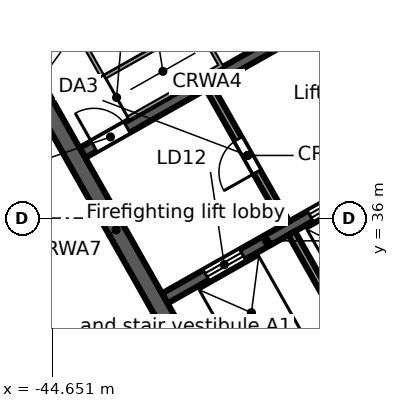
"""IFC4 building model, lengths in metres.
Left out: names, types, materials, properties, quantities, classifications, styles, units other than length and angle.
Written with IfcOpenShell. Run it as: python <this file> out.ifc"""

import sys

from ifc_helpers import new_model, si_unit, direction, frame, frame_2d, origin, place, context, subcontext, project, spatial, rectangle, extrude, element, fill, save


model = new_model("IFC4")
c1 = context("Model", 3, precision=1e-05, world=origin(), true_north=direction((0.0, 1.0)))
c2 = subcontext(c1, "Body", "Model", "MODEL_VIEW")
j1 = project(units=[si_unit("LENGTHUNIT", "METRE"), si_unit("PLANEANGLEUNIT", "RADIAN")], contexts=[c1])
p1 = place(None, origin())
s1 = spatial("IfcSite", under=j1, at=p1, CompositionType="ELEMENT")
p2 = place(p1, origin())
s2 = spatial("IfcBuilding", under=s1, at=p2, CompositionType="ELEMENT")
p3 = place(p2, frame((0.0, 0.0, 211.4)))
s3 = spatial("IfcBuildingStorey", under=s2, at=p3, CompositionType="ELEMENT", Elevation=211.4)
p4 = place(p3, frame((-0.046, 47.974, 0.0), z_axis=(0.0, 0.0, 1.0), x_axis=(-0.870356579543, -0.492421998337, 0.0)))
e1 = element("IfcWall", 1, at=p4, inside=s3, PredefinedType="STANDARD", context=c2, shape_type="SweptSolid", body=[
    extrude(rectangle(XDim=43.754, YDim=0.25, at=frame_2d((21.877, 0.0))), origin(), (0.0, 0.0, 1.0), 3.62),
])
p5 = place(p4, frame((41.061, 0.0, 0.8)))
e2 = element("IfcOpeningElement", 2, at=p5, cuts=e1, PredefinedType="OPENING", context=c2, shape_type="SweptSolid", body=[
    extrude(rectangle(XDim=2.4, YDim=2.2, at=frame_2d((1.2, 1.1))), frame((0.0, 0.135, 0.0), z_axis=(0.0, -1.0, 0.0), x_axis=(1.0, 0.0, 0.0)), (0.0, 0.0, 1.0), 0.27),
])
p6 = place(p4, frame((38.443, 0.0, 0.0)))
e3 = element("IfcOpeningElement", 3, at=p6, cuts=e1, PredefinedType="OPENING", context=c2, shape_type="SweptSolid", body=[
    extrude(rectangle(XDim=1.8, YDim=2.4, at=frame_2d((0.9, 1.2))), frame((0.0, 0.135, 0.0), z_axis=(0.0, -1.0, 0.0), x_axis=(1.0, 0.0, 0.0)), (0.0, 0.0, 1.0), 0.27),
])
p7 = place(p4, frame((35.225, 0.0, 0.8)))
e4 = element("IfcOpeningElement", 4, at=p7, cuts=e1, PredefinedType="OPENING", context=c2, shape_type="SweptSolid", body=[
    extrude(rectangle(XDim=2.4, YDim=2.2, at=frame_2d((1.2, 1.1))), frame((0.0, 0.135, 0.0), z_axis=(0.0, -1.0, 0.0), x_axis=(1.0, 0.0, 0.0)), (0.0, 0.0, 1.0), 0.27),
])
p8 = place(p4, frame((32.307, 0.0, 0.8)))
e5 = element("IfcOpeningElement", 5, at=p8, cuts=e1, PredefinedType="OPENING", context=c2, shape_type="SweptSolid", body=[
    extrude(rectangle(XDim=2.4, YDim=2.2, at=frame_2d((1.2, 1.1))), frame((0.0, 0.135, 0.0), z_axis=(0.0, -1.0, 0.0), x_axis=(1.0, 0.0, 0.0)), (0.0, 0.0, 1.0), 0.27),
])
p9 = place(p4, frame((29.688, 0.0, 0.0)))
e6 = element("IfcOpeningElement", 6, at=p9, cuts=e1, PredefinedType="OPENING", context=c2, shape_type="SweptSolid", body=[
    extrude(rectangle(XDim=1.8, YDim=2.4, at=frame_2d((0.9, 1.2))), frame((0.0, 0.135, 0.0), z_axis=(0.0, -1.0, 0.0), x_axis=(1.0, 0.0, 0.0)), (0.0, 0.0, 1.0), 0.27),
])
p10 = place(p4, frame((26.47, 0.0, 0.8)))
e7 = element("IfcOpeningElement", 7, at=p10, cuts=e1, PredefinedType="OPENING", context=c2, shape_type="SweptSolid", body=[
    extrude(rectangle(XDim=2.4, YDim=2.2, at=frame_2d((1.2, 1.1))), frame((0.0, 0.135, 0.0), z_axis=(0.0, -1.0, 0.0), x_axis=(1.0, 0.0, 0.0)), (0.0, 0.0, 1.0), 0.27),
])
p11 = place(p4, frame((23.552, 0.0, 0.8)))
e8 = element("IfcOpeningElement", 8, at=p11, cuts=e1, PredefinedType="OPENING", context=c2, shape_type="SweptSolid", body=[
    extrude(rectangle(XDim=2.4, YDim=2.2, at=frame_2d((1.2, 1.1))), frame((0.0, 0.135, 0.0), z_axis=(0.0, -1.0, 0.0), x_axis=(1.0, 0.0, 0.0)), (0.0, 0.0, 1.0), 0.27),
])
p12 = place(p4, frame((20.934, 0.0, 0.0)))
e9 = element("IfcOpeningElement", 9, at=p12, cuts=e1, PredefinedType="OPENING", context=c2, shape_type="SweptSolid", body=[
    extrude(rectangle(XDim=1.8, YDim=2.4, at=frame_2d((0.9, 1.2))), frame((0.0, 0.135, 0.0), z_axis=(0.0, -1.0, 0.0), x_axis=(1.0, 0.0, 0.0)), (0.0, 0.0, 1.0), 0.27),
])
p13 = place(p4, frame((17.716, 0.0, 0.8)))
e10 = element("IfcOpeningElement", 10, at=p13, cuts=e1, PredefinedType="OPENING", context=c2, shape_type="SweptSolid", body=[
    extrude(rectangle(XDim=2.4, YDim=2.2, at=frame_2d((1.2, 1.1))), frame((0.0, 0.135, 0.0), z_axis=(0.0, -1.0, 0.0), x_axis=(1.0, 0.0, 0.0)), (0.0, 0.0, 1.0), 0.27),
])
p14 = place(p4, frame((14.798, 0.0, 0.8)))
e11 = element("IfcOpeningElement", 11, at=p14, cuts=e1, PredefinedType="OPENING", context=c2, shape_type="SweptSolid", body=[
    extrude(rectangle(XDim=2.4, YDim=2.2, at=frame_2d((1.2, 1.1))), frame((0.0, 0.135, 0.0), z_axis=(0.0, -1.0, 0.0), x_axis=(1.0, 0.0, 0.0)), (0.0, 0.0, 1.0), 0.27),
])
p15 = place(p4, frame((12.179, 0.0, 0.0)))
e12 = element("IfcOpeningElement", 12, at=p15, cuts=e1, PredefinedType="OPENING", context=c2, shape_type="SweptSolid", body=[
    extrude(rectangle(XDim=1.8, YDim=2.4, at=frame_2d((0.9, 1.2))), frame((0.0, 0.135, 0.0), z_axis=(0.0, -1.0, 0.0), x_axis=(1.0, 0.0, 0.0)), (0.0, 0.0, 1.0), 0.27),
])
p16 = place(p4, frame((8.961, 0.0, 0.8)))
e13 = element("IfcOpeningElement", 13, at=p16, cuts=e1, PredefinedType="OPENING", context=c2, shape_type="SweptSolid", body=[
    extrude(rectangle(XDim=2.4, YDim=2.2, at=frame_2d((1.2, 1.1))), frame((0.0, 0.135, 0.0), z_axis=(0.0, -1.0, 0.0), x_axis=(1.0, 0.0, 0.0)), (0.0, 0.0, 1.0), 0.27),
])
p17 = place(p4, frame((6.043, 0.0, 0.8)))
e14 = element("IfcOpeningElement", 14, at=p17, cuts=e1, PredefinedType="OPENING", context=c2, shape_type="SweptSolid", body=[
    extrude(rectangle(XDim=2.4, YDim=2.2, at=frame_2d((1.2, 1.1))), frame((0.0, 0.135, 0.0), z_axis=(0.0, -1.0, 0.0), x_axis=(1.0, 0.0, 0.0)), (0.0, 0.0, 1.0), 0.27),
])
p18 = place(p4, frame((3.425, 0.0, 0.0)))
e15 = element("IfcOpeningElement", 15, at=p18, cuts=e1, PredefinedType="OPENING", context=c2, shape_type="SweptSolid", body=[
    extrude(rectangle(XDim=1.8, YDim=2.4, at=frame_2d((0.9, 1.2))), frame((0.0, 0.135, 0.0), z_axis=(0.0, -1.0, 0.0), x_axis=(1.0, 0.0, 0.0)), (0.0, 0.0, 1.0), 0.27),
])
p19 = place(p4, frame((0.207, 0.0, 0.8)))
e16 = element("IfcOpeningElement", 16, at=p19, cuts=e1, PredefinedType="OPENING", context=c2, shape_type="SweptSolid", body=[
    extrude(rectangle(XDim=2.4, YDim=2.2, at=frame_2d((1.2, 1.1))), frame((0.0, 0.135, 0.0), z_axis=(0.0, -1.0, 0.0), x_axis=(1.0, 0.0, 0.0)), (0.0, 0.0, 1.0), 0.27),
])
p20 = place(p3, frame((-58.732, 38.771, 0.0), z_axis=(0.0, 0.0, 1.0), x_axis=(0.870354824205, 0.492425100887, 0.0)))
e17 = element("IfcWall", 17, at=p20, inside=s3, PredefinedType="STANDARD", context=c2, shape_type="SweptSolid", body=[
    extrude(rectangle(XDim=64.006, YDim=0.25, at=frame_2d((32.003, 0.0))), origin(), (0.0, 0.0, 1.0), 3.62),
])
p21 = place(p20, frame((61.259, 0.0, 0.8)))
e18 = element("IfcOpeningElement", 18, at=p21, cuts=e17, PredefinedType="OPENING", context=c2, shape_type="SweptSolid", body=[
    extrude(rectangle(XDim=2.4, YDim=2.2, at=frame_2d((1.2, 1.1))), frame((0.0, 0.135, 0.0), z_axis=(0.0, -1.0, 0.0), x_axis=(1.0, 0.0, 0.0)), (0.0, 0.0, 1.0), 0.27),
])
p22 = place(p20, frame((58.216, 0.0, 0.8)))
e19 = element("IfcOpeningElement", 19, at=p22, cuts=e17, PredefinedType="OPENING", context=c2, shape_type="SweptSolid", body=[
    extrude(rectangle(XDim=2.4, YDim=2.2, at=frame_2d((1.2, 1.1))), frame((0.0, 0.135, 0.0), z_axis=(0.0, -1.0, 0.0), x_axis=(1.0, 0.0, 0.0)), (0.0, 0.0, 1.0), 0.27),
])
p23 = place(p20, frame((55.173, 0.0, 0.8)))
e20 = element("IfcOpeningElement", 20, at=p23, cuts=e17, PredefinedType="OPENING", context=c2, shape_type="SweptSolid", body=[
    extrude(rectangle(XDim=2.4, YDim=2.2, at=frame_2d((1.2, 1.1))), frame((0.0, 0.135, 0.0), z_axis=(0.0, -1.0, 0.0), x_axis=(1.0, 0.0, 0.0)), (0.0, 0.0, 1.0), 0.27),
])
p24 = place(p20, frame((52.129, 0.0, 0.8)))
e21 = element("IfcOpeningElement", 21, at=p24, cuts=e17, PredefinedType="OPENING", context=c2, shape_type="SweptSolid", body=[
    extrude(rectangle(XDim=2.4, YDim=2.2, at=frame_2d((1.2, 1.1))), frame((0.0, 0.135, 0.0), z_axis=(0.0, -1.0, 0.0), x_axis=(1.0, 0.0, 0.0)), (0.0, 0.0, 1.0), 0.27),
])
p25 = place(p20, frame((49.086, 0.0, 0.8)))
e22 = element("IfcOpeningElement", 22, at=p25, cuts=e17, PredefinedType="OPENING", context=c2, shape_type="SweptSolid", body=[
    extrude(rectangle(XDim=2.4, YDim=2.2, at=frame_2d((1.2, 1.1))), frame((0.0, 0.135, 0.0), z_axis=(0.0, -1.0, 0.0), x_axis=(1.0, 0.0, 0.0)), (0.0, 0.0, 1.0), 0.27),
])
p26 = place(p20, frame((46.043, 0.0, 0.8)))
e23 = element("IfcOpeningElement", 23, at=p26, cuts=e17, PredefinedType="OPENING", context=c2, shape_type="SweptSolid", body=[
    extrude(rectangle(XDim=2.4, YDim=2.2, at=frame_2d((1.2, 1.1))), frame((0.0, 0.135, 0.0), z_axis=(0.0, -1.0, 0.0), x_axis=(1.0, 0.0, 0.0)), (0.0, 0.0, 1.0), 0.27),
])
p27 = place(p20, frame((43.0, 0.0, 0.8)))
e24 = element("IfcOpeningElement", 24, at=p27, cuts=e17, PredefinedType="OPENING", context=c2, shape_type="SweptSolid", body=[
    extrude(rectangle(XDim=2.4, YDim=2.2, at=frame_2d((1.2, 1.1))), frame((0.0, 0.135, 0.0), z_axis=(0.0, -1.0, 0.0), x_axis=(1.0, 0.0, 0.0)), (0.0, 0.0, 1.0), 0.27),
])
p28 = place(p20, frame((39.956, 0.0, 0.8)))
e25 = element("IfcOpeningElement", 25, at=p28, cuts=e17, PredefinedType="OPENING", context=c2, shape_type="SweptSolid", body=[
    extrude(rectangle(XDim=2.4, YDim=2.2, at=frame_2d((1.2, 1.1))), frame((0.0, 0.135, 0.0), z_axis=(0.0, -1.0, 0.0), x_axis=(1.0, 0.0, 0.0)), (0.0, 0.0, 1.0), 0.27),
])
p29 = place(p20, frame((36.913, 0.0, 0.8)))
e26 = element("IfcOpeningElement", 26, at=p29, cuts=e17, PredefinedType="OPENING", context=c2, shape_type="SweptSolid", body=[
    extrude(rectangle(XDim=2.4, YDim=2.2, at=frame_2d((1.2, 1.1))), frame((0.0, 0.135, 0.0), z_axis=(0.0, -1.0, 0.0), x_axis=(1.0, 0.0, 0.0)), (0.0, 0.0, 1.0), 0.27),
])
p30 = place(p20, frame((33.87, 0.0, 0.8)))
e27 = element("IfcOpeningElement", 27, at=p30, cuts=e17, PredefinedType="OPENING", context=c2, shape_type="SweptSolid", body=[
    extrude(rectangle(XDim=2.4, YDim=2.2, at=frame_2d((1.2, 1.1))), frame((0.0, 0.135, 0.0), z_axis=(0.0, -1.0, 0.0), x_axis=(1.0, 0.0, 0.0)), (0.0, 0.0, 1.0), 0.27),
])
p31 = place(p20, frame((30.826, 0.0, 0.8)))
e28 = element("IfcOpeningElement", 28, at=p31, cuts=e17, PredefinedType="OPENING", context=c2, shape_type="SweptSolid", body=[
    extrude(rectangle(XDim=2.4, YDim=2.2, at=frame_2d((1.2, 1.1))), frame((0.0, 0.135, 0.0), z_axis=(0.0, -1.0, 0.0), x_axis=(1.0, 0.0, 0.0)), (0.0, 0.0, 1.0), 0.27),
])
p32 = place(p20, frame((27.783, 0.0, 0.8)))
e29 = element("IfcOpeningElement", 29, at=p32, cuts=e17, PredefinedType="OPENING", context=c2, shape_type="SweptSolid", body=[
    extrude(rectangle(XDim=2.4, YDim=2.2, at=frame_2d((1.2, 1.1))), frame((0.0, 0.135, 0.0), z_axis=(0.0, -1.0, 0.0), x_axis=(1.0, 0.0, 0.0)), (0.0, 0.0, 1.0), 0.27),
])
p33 = place(p20, frame((24.74, 0.0, 0.8)))
e30 = element("IfcOpeningElement", 30, at=p33, cuts=e17, PredefinedType="OPENING", context=c2, shape_type="SweptSolid", body=[
    extrude(rectangle(XDim=2.4, YDim=2.2, at=frame_2d((1.2, 1.1))), frame((0.0, 0.135, 0.0), z_axis=(0.0, -1.0, 0.0), x_axis=(1.0, 0.0, 0.0)), (0.0, 0.0, 1.0), 0.27),
])
p34 = place(p20, frame((21.696, 0.0, 0.8)))
e31 = element("IfcOpeningElement", 31, at=p34, cuts=e17, PredefinedType="OPENING", context=c2, shape_type="SweptSolid", body=[
    extrude(rectangle(XDim=2.4, YDim=2.2, at=frame_2d((1.2, 1.1))), frame((0.0, 0.135, 0.0), z_axis=(0.0, -1.0, 0.0), x_axis=(1.0, 0.0, 0.0)), (0.0, 0.0, 1.0), 0.27),
])
p35 = place(p20, frame((18.653, 0.0, 0.8)))
e32 = element("IfcOpeningElement", 32, at=p35, cuts=e17, PredefinedType="OPENING", context=c2, shape_type="SweptSolid", body=[
    extrude(rectangle(XDim=2.4, YDim=2.2, at=frame_2d((1.2, 1.1))), frame((0.0, 0.135, 0.0), z_axis=(0.0, -1.0, 0.0), x_axis=(1.0, 0.0, 0.0)), (0.0, 0.0, 1.0), 0.27),
])
p36 = place(p20, frame((15.61, 0.0, 0.8)))
e33 = element("IfcOpeningElement", 33, at=p36, cuts=e17, PredefinedType="OPENING", context=c2, shape_type="SweptSolid", body=[
    extrude(rectangle(XDim=2.4, YDim=2.2, at=frame_2d((1.2, 1.1))), frame((0.0, 0.135, 0.0), z_axis=(0.0, -1.0, 0.0), x_axis=(1.0, 0.0, 0.0)), (0.0, 0.0, 1.0), 0.27),
])
p37 = place(p20, frame((12.567, 0.0, 0.8)))
e34 = element("IfcOpeningElement", 34, at=p37, cuts=e17, PredefinedType="OPENING", context=c2, shape_type="SweptSolid", body=[
    extrude(rectangle(XDim=2.4, YDim=2.2, at=frame_2d((1.2, 1.1))), frame((0.0, 0.135, 0.0), z_axis=(0.0, -1.0, 0.0), x_axis=(1.0, 0.0, 0.0)), (0.0, 0.0, 1.0), 0.27),
])
p38 = place(p20, frame((9.523, 0.0, 0.8)))
e35 = element("IfcOpeningElement", 35, at=p38, cuts=e17, PredefinedType="OPENING", context=c2, shape_type="SweptSolid", body=[
    extrude(rectangle(XDim=2.4, YDim=2.2, at=frame_2d((1.2, 1.1))), frame((0.0, 0.135, 0.0), z_axis=(0.0, -1.0, 0.0), x_axis=(1.0, 0.0, 0.0)), (0.0, 0.0, 1.0), 0.27),
])
p39 = place(p20, frame((6.48, 0.0, 0.8)))
e36 = element("IfcOpeningElement", 36, at=p39, cuts=e17, PredefinedType="OPENING", context=c2, shape_type="SweptSolid", body=[
    extrude(rectangle(XDim=2.4, YDim=2.2, at=frame_2d((1.2, 1.1))), frame((0.0, 0.135, 0.0), z_axis=(0.0, -1.0, 0.0), x_axis=(1.0, 0.0, 0.0)), (0.0, 0.0, 1.0), 0.27),
])
p40 = place(p20, frame((3.437, 0.0, 0.8)))
e37 = element("IfcOpeningElement", 37, at=p40, cuts=e17, PredefinedType="OPENING", context=c2, shape_type="SweptSolid", body=[
    extrude(rectangle(XDim=2.4, YDim=2.2, at=frame_2d((1.2, 1.1))), frame((0.0, 0.135, 0.0), z_axis=(0.0, -1.0, 0.0), x_axis=(1.0, 0.0, 0.0)), (0.0, 0.0, 1.0), 0.27),
])
p41 = place(p20, frame((0.393, 0.0, 0.8)))
e38 = element("IfcOpeningElement", 38, at=p41, cuts=e17, PredefinedType="OPENING", context=c2, shape_type="SweptSolid", body=[
    extrude(rectangle(XDim=2.4, YDim=2.2, at=frame_2d((1.2, 1.1))), frame((0.0, 0.135, 0.0), z_axis=(0.0, -1.0, 0.0), x_axis=(1.0, 0.0, 0.0)), (0.0, 0.0, 1.0), 0.27),
])
p42 = place(p3, frame((-44.115, 26.507, 0.0), z_axis=(0.0, 0.0, 1.0), x_axis=(-0.857166583633, 0.515039268311, 0.0)))
e39 = element("IfcWall", 39, at=p42, inside=s3, PredefinedType="STANDARD", context=c2, shape_type="SweptSolid", body=[
    extrude(rectangle(XDim=17.106, YDim=0.25, at=frame_2d((8.553, 0.0))), origin(), (0.0, 0.0, 1.0), 3.62),
])
p43 = place(p42, frame((14.417, 0.0, 0.8)))
e40 = element("IfcOpeningElement", 40, at=p43, cuts=e39, PredefinedType="OPENING", context=c2, shape_type="SweptSolid", body=[
    extrude(rectangle(XDim=2.4, YDim=2.2, at=frame_2d((1.2, 1.1))), frame((0.0, 0.135, 0.0), z_axis=(0.0, -1.0, 0.0), x_axis=(1.0, 0.0, 0.0)), (0.0, 0.0, 1.0), 0.27),
])
p44 = place(p42, frame((11.584, 0.0, 0.8)))
e41 = element("IfcOpeningElement", 41, at=p44, cuts=e39, PredefinedType="OPENING", context=c2, shape_type="SweptSolid", body=[
    extrude(rectangle(XDim=2.4, YDim=2.2, at=frame_2d((1.2, 1.1))), frame((0.0, 0.135, 0.0), z_axis=(0.0, -1.0, 0.0), x_axis=(1.0, 0.0, 0.0)), (0.0, 0.0, 1.0), 0.27),
])
p45 = place(p42, frame((8.75, 0.0, 0.8)))
e42 = element("IfcOpeningElement", 42, at=p45, cuts=e39, PredefinedType="OPENING", context=c2, shape_type="SweptSolid", body=[
    extrude(rectangle(XDim=2.4, YDim=2.2, at=frame_2d((1.2, 1.1))), frame((0.0, 0.135, 0.0), z_axis=(0.0, -1.0, 0.0), x_axis=(1.0, 0.0, 0.0)), (0.0, 0.0, 1.0), 0.27),
])
p46 = place(p42, frame((5.917, 0.0, 0.8)))
e43 = element("IfcOpeningElement", 43, at=p46, cuts=e39, PredefinedType="OPENING", context=c2, shape_type="SweptSolid", body=[
    extrude(rectangle(XDim=2.4, YDim=2.2, at=frame_2d((1.2, 1.1))), frame((0.0, 0.135, 0.0), z_axis=(0.0, -1.0, 0.0), x_axis=(1.0, 0.0, 0.0)), (0.0, 0.0, 1.0), 0.27),
])
p47 = place(p42, frame((3.084, 0.0, 0.8)))
e44 = element("IfcOpeningElement", 44, at=p47, cuts=e39, PredefinedType="OPENING", context=c2, shape_type="SweptSolid", body=[
    extrude(rectangle(XDim=2.4, YDim=2.2, at=frame_2d((1.2, 1.1))), frame((0.0, 0.135, 0.0), z_axis=(0.0, -1.0, 0.0), x_axis=(1.0, 0.0, 0.0)), (0.0, 0.0, 1.0), 0.27),
])
p48 = place(p42, frame((0.25, 0.0, 0.8)))
e45 = element("IfcOpeningElement", 45, at=p48, cuts=e39, PredefinedType="OPENING", context=c2, shape_type="SweptSolid", body=[
    extrude(rectangle(XDim=2.4, YDim=2.2, at=frame_2d((1.2, 1.1))), frame((0.0, 0.135, 0.0), z_axis=(0.0, -1.0, 0.0), x_axis=(1.0, 0.0, 0.0)), (0.0, 0.0, 1.0), 0.27),
])
p49 = place(p3, frame((-39.825, 29.684, 0.0), z_axis=(0.0, 0.0, 1.0), x_axis=(0.870353598469, 0.492427267353, 0.0)))
e46 = element("IfcWall", 46, at=p49, inside=s3, PredefinedType="SOLIDWALL", context=c2, shape_type="SweptSolid", body=[
    extrude(rectangle(XDim=17.0, YDim=0.45, at=frame_2d((8.5, 0.0))), origin(), (0.0, 0.0, 1.0), 3.62),
])
p50 = place(p49, frame((7.2, 0.0, 0.0)))
e47 = element("IfcOpeningElement", 47, at=p50, cuts=e46, PredefinedType="OPENING", context=c2, shape_type="SweptSolid", body=[
    extrude(rectangle(XDim=1.2, YDim=2.1, at=frame_2d((0.6, 1.05))), frame((0.0, 0.235, 0.0), z_axis=(0.0, -1.0, 0.0), x_axis=(1.0, 0.0, 0.0)), (0.0, 0.0, 1.0), 0.47),
])
p51 = place(p3, frame((-41.687, 33.887, 0.0), z_axis=(0.0, 0.0, 1.0), x_axis=(0.870355736587, 0.49242348826, 0.0)))
e48 = element("IfcWall", 48, at=p51, inside=s3, PredefinedType="SOLIDWALL", context=c2, shape_type="SweptSolid", body=[
    extrude(rectangle(XDim=6.15, YDim=0.3, at=frame_2d((3.075, 0.0))), origin(), (0.0, 0.0, 1.0), 3.62),
])
p52 = place(p51, frame((1.25, 0.0, 0.0)))
e49 = element("IfcOpeningElement", 49, at=p52, cuts=e48, PredefinedType="OPENING", context=c2, shape_type="SweptSolid", body=[
    extrude(rectangle(XDim=1.1, YDim=2.1, at=frame_2d((0.55, 1.05))), frame((0.0, 0.16, 0.0), z_axis=(0.0, -1.0, 0.0), x_axis=(1.0, 0.0, 0.0)), (0.0, 0.0, 1.0), 0.32),
])
p53 = place(p51, frame((4.4, 0.0, 0.0)))
e50 = element("IfcOpeningElement", 50, at=p53, cuts=e48, PredefinedType="OPENING", context=c2, shape_type="SweptSolid", body=[
    extrude(rectangle(XDim=1.1, YDim=2.1, at=frame_2d((0.55, 1.05))), frame((0.0, 0.16, 0.0), z_axis=(0.0, -1.0, 0.0), x_axis=(1.0, 0.0, 0.0)), (0.0, 0.0, 1.0), 0.32),
])
p54 = place(p3, frame((-43.853, 37.717, 0.0), z_axis=(0.0, 0.0, 1.0), x_axis=(0.870360409231, 0.492415229297, 0.0)))
e51 = element("IfcWall", 51, at=p54, inside=s3, PredefinedType="SOLIDWALL", context=c2, shape_type="SweptSolid", body=[
    extrude(rectangle(XDim=7.55, YDim=0.3, at=frame_2d((3.775, 0.0))), origin(), (0.0, 0.0, 1.0), 3.62),
])
p55 = place(p54, frame((0.35, 0.0, 0.0)))
e52 = element("IfcOpeningElement", 52, at=p55, cuts=e51, PredefinedType="OPENING", context=c2, shape_type="SweptSolid", body=[
    extrude(rectangle(XDim=1.0, YDim=2.1, at=frame_2d((0.5, 1.05))), frame((0.0, 0.16, 0.0), z_axis=(0.0, -1.0, 0.0), x_axis=(1.0, 0.0, 0.0)), (0.0, 0.0, 1.0), 0.32),
])
p56 = place(p3, frame((-46.191, 41.392, 0.0), z_axis=(0.0, 0.0, 1.0), x_axis=(0.492421378713, -0.870356930107, 0.0)))
e53 = element("IfcWall", 53, at=p56, inside=s3, PredefinedType="SOLIDWALL", context=c2, shape_type="SweptSolid", body=[
    extrude(rectangle(XDim=13.1, YDim=0.45, at=frame_2d((6.55, 0.0))), origin(), (0.0, 0.0, 1.0), 3.62),
])
p57 = place(p3, frame((-38.349, 35.603, 0.0), z_axis=(0.0, 0.0, 1.0), x_axis=(0.492409653846, -0.870363563575, 0.0)))
e54 = element("IfcWall", 54, at=p57, inside=s3, PredefinedType="SOLIDWALL", context=c2, shape_type="SweptSolid", body=[
    extrude(rectangle(XDim=4.2, YDim=0.2, at=frame_2d((2.1, 0.0))), origin(), (0.0, 0.0, 1.0), 3.62),
])
p58 = place(p3, frame((-40.516, 39.433, 0.0), z_axis=(0.0, 0.0, 1.0), x_axis=(0.492453559952, -0.87033872216, 0.0)))
e55 = element("IfcWall", 55, at=p58, inside=s3, PredefinedType="PARTITIONING", context=c2, shape_type="SweptSolid", body=[
    extrude(rectangle(XDim=4.1, YDim=0.2, at=frame_2d((2.05, 0.0))), origin(), (0.0, 0.0, 1.0), 3.62),
])
p59 = place(p58, frame((1.55, 0.0, 0.0)))
e56 = element("IfcOpeningElement", 56, at=p59, cuts=e55, PredefinedType="OPENING", context=c2, shape_type="SweptSolid", body=[
    extrude(rectangle(XDim=1.0, YDim=2.1, at=frame_2d((0.5, 1.05))), frame((0.0, 0.11, 0.0), z_axis=(0.0, -1.0, 0.0), x_axis=(1.0, 0.0, 0.0)), (0.0, 0.0, 1.0), 0.22),
])
p60 = place(p3, frame((-48.843, 29.494, 0.0), z_axis=(0.0, 0.0, 1.0), x_axis=(0.870384139606, 0.492373282705, 0.0)))
e57 = element("IfcWall", 57, at=p60, inside=s3, PredefinedType="PARTITIONING", context=c2, shape_type="SweptSolid", body=[
    extrude(rectangle(XDim=7.941, YDim=0.125, at=frame_2d((3.971, 0.0))), origin(), (0.0, 0.0, 1.0), 2.9),
])
p61 = place(p60, frame((3.45, 0.0, 0.0)))
e58 = element("IfcOpeningElement", 58, at=p61, cuts=e57, PredefinedType="OPENING", context=c2, shape_type="SweptSolid", body=[
    extrude(rectangle(XDim=0.9, YDim=2.1, at=frame_2d((0.45, 1.05))), frame((0.0, 0.073, 0.0), z_axis=(0.0, -1.0, 0.0), x_axis=(1.0, 0.0, 0.0)), (0.0, 0.0, 1.0), 0.145),
])
p62 = place(p52, origin())
e59 = element("IfcDoor", 59, at=p62, inside=s3, OperationType="DOUBLE_DOOR_SLIDING", PredefinedType="DOOR", context=c2, shape_type="SweptSolid", body=[
    extrude(rectangle(XDim=1.1, YDim=2.1, at=frame_2d((0.55, 1.05))), frame((0.0, 0.025, 0.0), z_axis=(0.0, -1.0, 0.0), x_axis=(1.0, 0.0, 0.0)), (0.0, 0.0, 1.0), 0.05),
])
fill(e49, e59)
p63 = place(p53, origin())
e60 = element("IfcDoor", 60, at=p63, inside=s3, OperationType="DOUBLE_DOOR_SLIDING", PredefinedType="DOOR", context=c2, shape_type="SweptSolid", body=[
    extrude(rectangle(XDim=1.1, YDim=2.1, at=frame_2d((0.55, 1.05))), frame((0.0, 0.025, 0.0), z_axis=(0.0, -1.0, 0.0), x_axis=(1.0, 0.0, 0.0)), (0.0, 0.0, 1.0), 0.05),
])
fill(e50, e60)
p64 = place(p55, origin())
e61 = element("IfcDoor", 61, at=p64, inside=s3, OperationType="SINGLE_SWING_LEFT", PredefinedType="DOOR", context=c2, shape_type="SweptSolid", body=[
    extrude(rectangle(XDim=1.0, YDim=2.1, at=frame_2d((0.5, 1.05))), frame((0.0, 0.025, 0.0), z_axis=(0.0, -1.0, 0.0), x_axis=(1.0, 0.0, 0.0)), (0.0, 0.0, 1.0), 0.05),
])
fill(e52, e61)
p65 = place(p59, frame((1.0, 0.0, 0.0), z_axis=(0.0, 0.0, 1.0), x_axis=(-1.0, 0.0, 0.0)))
e62 = element("IfcDoor", 62, at=p65, inside=s3, OperationType="SINGLE_SWING_LEFT", PredefinedType="DOOR", context=c2, shape_type="SweptSolid", body=[
    extrude(rectangle(XDim=1.0, YDim=2.1, at=frame_2d((0.5, 1.05))), frame((0.0, 0.025, 0.0), z_axis=(0.0, -1.0, 0.0), x_axis=(1.0, 0.0, 0.0)), (0.0, 0.0, 1.0), 0.05),
])
fill(e56, e62)
save(model, sys.argv[1])
